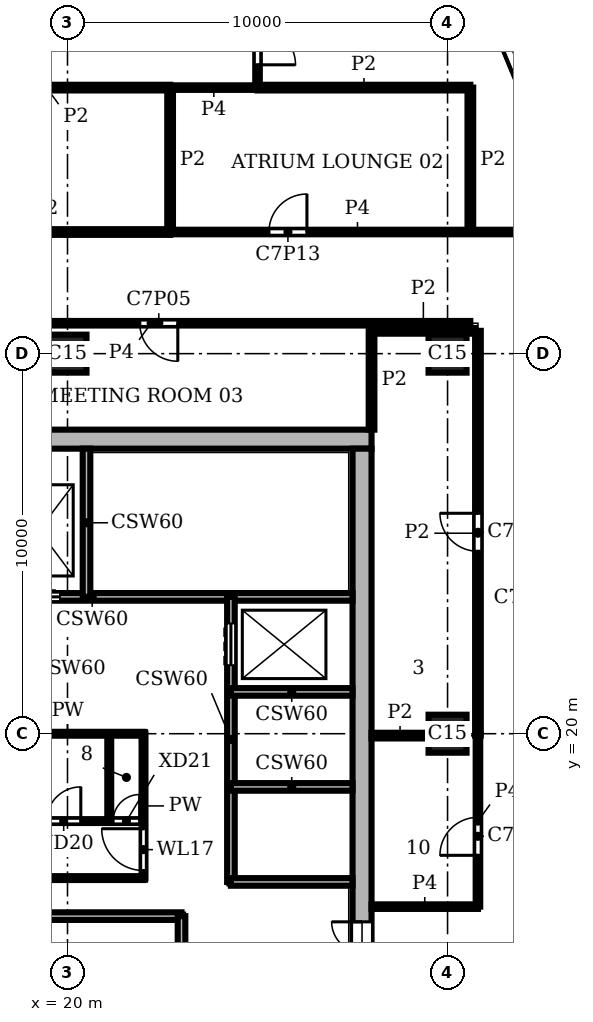
"""IFC4 building model, lengths in metres.
Left out: names, types, materials, properties, quantities, classifications, styles, units other than length and angle.
Written with IfcOpenShell. Run it as: python <this file> out.ifc"""

import sys

from ifc_helpers import new_model, si_unit, direction, frame, frame_2d, origin, origin_2d, place, context, subcontext, project, spatial, rectangle, extrude, element, fill, save


model = new_model("IFC4")
c1 = context("Model", 3, precision=1e-05, world=origin(), true_north=direction((0.0, 1.0)))
c2 = subcontext(c1, "Body", "Model", "MODEL_VIEW")
j1 = project(units=[si_unit("LENGTHUNIT", "METRE"), si_unit("PLANEANGLEUNIT", "RADIAN")], contexts=[c1])
p1 = place(None, origin())
s1 = spatial("IfcSite", under=j1, at=p1, CompositionType="ELEMENT")
p2 = place(p1, origin())
s2 = spatial("IfcBuilding", under=s1, at=p2, CompositionType="ELEMENT")
p3 = place(p2, frame((0.0, 0.0, 313.8)))
s3 = spatial("IfcBuildingStorey", under=s2, at=p3, CompositionType="ELEMENT", Elevation=313.8)
for number, where, z_axis, x_axis in (
    (1, (20.0, 30.0, 0.0), (0.0, 0.0, 1.0), (1.0, 0.0, 0.0)),
    (2, (30.0, 20.0, 0.0), (0.0, 0.0, 1.0), (1.0, 0.0, 0.0)),
    (3, (30.0, 30.0, 0.0), (0.0, 0.0, 1.0), (1.0, 0.0, 0.0)),
):
    element("IfcColumn", number, at=place(p3, frame(where, z_axis=z_axis, x_axis=x_axis)), inside=s3, PredefinedType="COLUMN", context=c2, shape_type="SweptSolid", body=[
        extrude(rectangle(XDim=1.0, YDim=1.0, at=origin_2d()), origin(), (0.0, 0.0, 1.0), 3.9),
    ])
p4 = place(p3, frame((27.75, 8.5, 0.0), z_axis=(0.0, 0.0, 1.0), x_axis=(0.0, 1.0, 0.0)))
e4 = element("IfcWall", 4, at=p4, inside=s3, PredefinedType="SHEAR", context=c2, shape_type="SweptSolid", body=[
    extrude(rectangle(XDim=19.0, YDim=0.5, at=frame_2d((9.5, 0.0))), origin(), (0.0, 0.0, 1.0), 3.9),
])
p5 = place(p4, frame((4.95, 0.0, 0.0)))
e5 = element("IfcOpeningElement", 5, at=p5, cuts=e4, PredefinedType="OPENING", context=c2, shape_type="SweptSolid", body=[
    extrude(rectangle(XDim=1.6, YDim=2.1, at=frame_2d((0.8, 1.05))), frame((0.0, 0.26, 0.0), z_axis=(0.0, -1.0, 0.0), x_axis=(1.0, 0.0, 0.0)), (0.0, 0.0, 1.0), 0.52),
])
p6 = place(p3, frame((28.0, 27.75, 0.0), z_axis=(0.0, 0.0, 1.0), x_axis=(-1.0, 0.0, 0.0)))
e6 = element("IfcWall", 6, at=p6, inside=s3, PredefinedType="SHEAR", context=c2, shape_type="SweptSolid", body=[
    extrude(rectangle(XDim=20.0, YDim=0.5, at=frame_2d((10.0, 0.0))), origin(), (0.0, 0.0, 1.0), 3.9),
])
p7 = place(p3, frame((33.362, 33.974, 0.0), z_axis=(0.0, 0.0, 1.0), x_axis=(-0.382655745237, 0.923891000409, 0.0)))
e7 = element("IfcWall", 7, at=p7, inside=s3, PredefinedType="SOLIDWALL", context=c2, shape_type="SweptSolid", body=[
    extrude(rectangle(XDim=6.053, YDim=0.4, at=frame_2d((3.027, 0.0))), origin(), (0.0, 0.0, 1.0), 3.9),
])
p8 = place(p7, frame((0.227, 0.0, 0.9)))
e8 = element("IfcOpeningElement", 8, at=p8, cuts=e7, PredefinedType="OPENING", context=c2, shape_type="SweptSolid", body=[
    extrude(rectangle(XDim=5.6, YDim=2.35, at=frame_2d((2.8, 1.175))), frame((0.0, 0.21, 0.0), z_axis=(0.0, -1.0, 0.0), x_axis=(1.0, 0.0, 0.0)), (0.0, 0.0, 1.0), 0.42),
])
p9 = place(p3, frame((13.3, 15.2, 0.0), z_axis=(0.0, 0.0, 1.0), x_axis=(1.0, 0.0, 0.0)))
e9 = element("IfcWall", 9, at=p9, inside=s3, PredefinedType="SHEAR", context=c2, shape_type="SweptSolid", body=[
    extrude(rectangle(XDim=9.7, YDim=0.2, at=frame_2d((4.85, 0.0))), origin(), (0.0, 0.0, 1.0), 3.58),
])
p10 = place(p3, frame((24.3, 16.1, 0.0), z_axis=(0.0, 0.0, 1.0), x_axis=(1.0, 0.0, 0.0)))
e10 = element("IfcWall", 10, at=p10, inside=s3, PredefinedType="SHEAR", context=c2, shape_type="SweptSolid", body=[
    extrude(rectangle(XDim=3.2, YDim=0.2, at=frame_2d((1.6, 0.0))), origin(), (0.0, 0.0, 1.0), 3.58),
])
p11 = place(p3, frame((14.0, 16.2, 0.0), z_axis=(0.0, 0.0, 1.0), x_axis=(1.0, 0.0, 0.0)))
e11 = element("IfcWall", 11, at=p11, inside=s3, PredefinedType="PARTITIONING", context=c2, shape_type="SweptSolid", body=[
    extrude(rectangle(XDim=8.0, YDim=0.1, at=frame_2d((4.0, 0.0))), origin(), (0.0, 0.0, 1.0), 3.58),
])
p12 = place(p3, frame((14.0, 17.7, 0.0), z_axis=(0.0, 0.0, 1.0), x_axis=(1.0, 0.0, 0.0)))
e12 = element("IfcWall", 12, at=p12, inside=s3, PredefinedType="PARTITIONING", context=c2, shape_type="SweptSolid", body=[
    extrude(rectangle(XDim=8.0, YDim=0.1, at=frame_2d((4.0, 0.0))), origin(), (0.0, 0.0, 1.0), 3.58),
])
p13 = place(p12, frame((0.45, 0.0, 0.0)))
e13 = element("IfcOpeningElement", 13, at=p13, cuts=e12, PredefinedType="OPENING", context=c2, shape_type="SweptSolid", body=[
    extrude(rectangle(XDim=0.9, YDim=2.1, at=frame_2d((0.45, 1.05))), frame((0.0, 0.06, 0.0), z_axis=(0.0, -1.0, 0.0), x_axis=(1.0, 0.0, 0.0)), (0.0, 0.0, 1.0), 0.12),
])
p14 = place(p12, frame((2.8, 0.0, 0.0)))
e14 = element("IfcOpeningElement", 14, at=p14, cuts=e12, PredefinedType="OPENING", context=c2, shape_type="SweptSolid", body=[
    extrude(rectangle(XDim=0.9, YDim=2.1, at=frame_2d((0.45, 1.05))), frame((0.0, 0.06, 0.0), z_axis=(0.0, -1.0, 0.0), x_axis=(1.0, 0.0, 0.0)), (0.0, 0.0, 1.0), 0.12),
])
p15 = place(p12, frame((5.45, 0.0, 0.0)))
e15 = element("IfcOpeningElement", 15, at=p15, cuts=e12, PredefinedType="OPENING", context=c2, shape_type="SweptSolid", body=[
    extrude(rectangle(XDim=0.9, YDim=2.1, at=frame_2d((0.45, 1.05))), frame((0.0, 0.06, 0.0), z_axis=(0.0, -1.0, 0.0), x_axis=(1.0, 0.0, 0.0)), (0.0, 0.0, 1.0), 0.12),
])
p16 = place(p12, frame((7.2, 0.0, 0.0)))
e16 = element("IfcOpeningElement", 16, at=p16, cuts=e12, PredefinedType="OPENING", context=c2, shape_type="SweptSolid", body=[
    extrude(rectangle(XDim=0.7, YDim=2.1, at=frame_2d((0.35, 1.05))), frame((0.0, 0.06, 0.0), z_axis=(0.0, -1.0, 0.0), x_axis=(1.0, 0.0, 0.0)), (0.0, 0.0, 1.0), 0.12),
])
p17 = place(p3, frame((24.3, 18.6, 0.0), z_axis=(0.0, 0.0, 1.0), x_axis=(1.0, 0.0, 0.0)))
e17 = element("IfcWall", 17, at=p17, inside=s3, PredefinedType="SHEAR", context=c2, shape_type="SweptSolid", body=[
    extrude(rectangle(XDim=3.2, YDim=0.2, at=frame_2d((1.6, 0.0))), origin(), (0.0, 0.0, 1.0), 3.58),
])
p18 = place(p3, frame((18.0, 20.0, 0.0), z_axis=(0.0, 0.0, 1.0), x_axis=(1.0, 0.0, 0.0)))
e18 = element("IfcWall", 18, at=p18, inside=s3, PredefinedType="PARTITIONING", context=c2, shape_type="SweptSolid", body=[
    extrude(rectangle(XDim=4.0, YDim=0.1, at=frame_2d((2.0, 0.0))), origin(), (0.0, 0.0, 1.0), 3.58),
])
p19 = place(p3, frame((24.3, 21.1, 0.0), z_axis=(0.0, 0.0, 1.0), x_axis=(1.0, 0.0, 0.0)))
e19 = element("IfcWall", 19, at=p19, inside=s3, PredefinedType="SHEAR", context=c2, shape_type="SweptSolid", body=[
    extrude(rectangle(XDim=3.2, YDim=0.2, at=frame_2d((1.6, 0.0))), origin(), (0.0, 0.0, 1.0), 3.58),
])
p20 = place(p3, frame((13.8, 23.6, 0.0), z_axis=(0.0, 0.0, 1.0), x_axis=(1.0, 0.0, 0.0)))
e20 = element("IfcWall", 20, at=p20, inside=s3, PredefinedType="SHEAR", context=c2, shape_type="SweptSolid", body=[
    extrude(rectangle(XDim=13.7, YDim=0.2, at=frame_2d((6.85, 0.0))), origin(), (0.0, 0.0, 1.0), 3.58),
])
p21 = place(p20, frame((2.4, 0.0, 0.0)))
e21 = element("IfcOpeningElement", 21, at=p21, cuts=e20, PredefinedType="OPENING", context=c2, shape_type="SweptSolid", body=[
    extrude(rectangle(XDim=1.1, YDim=2.1, at=frame_2d((0.55, 1.05))), frame((0.0, 0.11, 0.0), z_axis=(0.0, -1.0, 0.0), x_axis=(1.0, 0.0, 0.0)), (0.0, 0.0, 1.0), 0.22),
])
p22 = place(p20, frame((4.9, 0.0, 0.0)))
e22 = element("IfcOpeningElement", 22, at=p22, cuts=e20, PredefinedType="OPENING", context=c2, shape_type="SweptSolid", body=[
    extrude(rectangle(XDim=1.1, YDim=2.1, at=frame_2d((0.55, 1.05))), frame((0.0, 0.11, 0.0), z_axis=(0.0, -1.0, 0.0), x_axis=(1.0, 0.0, 0.0)), (0.0, 0.0, 1.0), 0.22),
])
p23 = place(p20, frame((0.15, 0.0, 0.0)))
e23 = element("IfcOpeningElement", 23, at=p23, cuts=e20, PredefinedType="OPENING", context=c2, shape_type="SweptSolid", body=[
    extrude(rectangle(XDim=1.0, YDim=2.1, at=frame_2d((0.5, 1.05))), frame((0.0, 0.11, 0.0), z_axis=(0.0, -1.0, 0.0), x_axis=(1.0, 0.0, 0.0)), (0.0, 0.0, 1.0), 0.22),
])
p24 = place(p3, frame((20.5, 23.6, 0.0), z_axis=(0.0, 0.0, 1.0), x_axis=(0.0, 1.0, 0.0)))
e24 = element("IfcWall", 24, at=p24, inside=s3, PredefinedType="SHEAR", context=c2, shape_type="SweptSolid", body=[
    extrude(rectangle(XDim=3.9, YDim=0.2, at=frame_2d((1.95, 0.0))), origin(), (0.0, 0.0, 1.0), 3.58),
])
p25 = place(p3, frame((21.1, 17.7, 0.0), z_axis=(0.0, 0.0, 1.0), x_axis=(0.0, 1.0, 0.0)))
e25 = element("IfcWall", 25, at=p25, inside=s3, PredefinedType="PARTITIONING", context=c2, shape_type="SweptSolid", body=[
    extrude(rectangle(XDim=2.3, YDim=0.1, at=frame_2d((1.15, 0.0))), origin(), (0.0, 0.0, 1.0), 3.58),
])
p26 = place(p3, frame((22.0, 16.2, 0.0), z_axis=(0.0, 0.0, 1.0), x_axis=(0.0, 1.0, 0.0)))
e26 = element("IfcWall", 26, at=p26, inside=s3, PredefinedType="PARTITIONING", context=c2, shape_type="SweptSolid", body=[
    extrude(rectangle(XDim=3.8, YDim=0.1, at=frame_2d((1.9, 0.0))), origin(), (0.0, 0.0, 1.0), 3.58),
])
p27 = place(p26, frame((0.2, 0.0, 0.0)))
e27 = element("IfcOpeningElement", 27, at=p27, cuts=e26, PredefinedType="OPENING", context=c2, shape_type="SweptSolid", body=[
    extrude(rectangle(XDim=1.1, YDim=2.1, at=frame_2d((0.55, 1.05))), frame((0.0, 0.06, 0.0), z_axis=(0.0, -1.0, 0.0), x_axis=(1.0, 0.0, 0.0)), (0.0, 0.0, 1.0), 0.12),
])
p28 = place(p3, frame((23.0, 12.4, 0.0), z_axis=(0.0, 0.0, 1.0), x_axis=(0.0, 1.0, 0.0)))
e28 = element("IfcWall", 28, at=p28, inside=s3, PredefinedType="SHEAR", context=c2, shape_type="SweptSolid", body=[
    extrude(rectangle(XDim=2.8, YDim=0.2, at=frame_2d((1.4, 0.0))), origin(), (0.0, 0.0, 1.0), 3.58),
])
p29 = place(p28, frame((0.8, 0.0, 0.0)))
e29 = element("IfcOpeningElement", 29, at=p29, cuts=e28, PredefinedType="OPENING", context=c2, shape_type="SweptSolid", body=[
    extrude(rectangle(XDim=1.2, YDim=2.1, at=frame_2d((0.6, 1.05))), frame((0.0, 0.11, 0.0), z_axis=(0.0, -1.0, 0.0), x_axis=(1.0, 0.0, 0.0)), (0.0, 0.0, 1.0), 0.22),
])
p30 = place(p3, frame((24.3, 16.1, 0.0), z_axis=(0.0, 0.0, 1.0), x_axis=(0.0, 1.0, 0.0)))
e30 = element("IfcWall", 30, at=p30, inside=s3, PredefinedType="SHEAR", context=c2, shape_type="SweptSolid", body=[
    extrude(rectangle(XDim=7.5, YDim=0.2, at=frame_2d((3.75, 0.0))), origin(), (0.0, 0.0, 1.0), 3.58),
])
p31 = place(p30, frame((5.7, 0.0, 0.0)))
e31 = element("IfcOpeningElement", 31, at=p31, cuts=e30, PredefinedType="OPENING", context=c2, shape_type="SweptSolid", body=[
    extrude(rectangle(XDim=1.1, YDim=2.1, at=frame_2d((0.55, 1.05))), frame((0.0, 0.11, 0.0), z_axis=(0.0, -1.0, 0.0), x_axis=(1.0, 0.0, 0.0)), (0.0, 0.0, 1.0), 0.22),
])
p32 = place(p3, frame((22.7, 33.2, 0.0), z_axis=(0.0, 0.0, 1.0), x_axis=(0.0, 1.0, 0.0)))
e32 = element("IfcWall", 32, at=p32, inside=s3, PredefinedType="PARTITIONING", context=c2, shape_type="SweptSolid", body=[
    extrude(rectangle(XDim=3.8, YDim=0.15, at=frame_2d((1.9, 0.0))), origin(), (0.0, 0.0, 1.0), 3.58),
])
p33 = place(p3, frame((28.0, 28.0, 0.0), z_axis=(0.0, 0.0, 1.0), x_axis=(0.0, 1.0, 0.0)))
e33 = element("IfcWall", 33, at=p33, inside=s3, PredefinedType="PARTITIONING", context=c2, shape_type="SweptSolid", body=[
    extrude(rectangle(XDim=2.598, YDim=0.15, at=frame_2d((1.299, 0.0))), origin(), (0.0, 0.0, 1.0), 3.58),
])
p34 = place(p3, frame((30.6, 33.2, 0.0), z_axis=(0.0, 0.0, 1.0), x_axis=(0.0, 1.0, 0.0)))
e34 = element("IfcWall", 34, at=p34, inside=s3, PredefinedType="PARTITIONING", context=c2, shape_type="SweptSolid", body=[
    extrude(rectangle(XDim=3.8, YDim=0.15, at=frame_2d((1.9, 0.0))), origin(), (0.0, 0.0, 1.0), 3.58),
])
p35 = place(p3, frame((30.8, 19.95, 0.0), z_axis=(0.0, 0.0, 1.0), x_axis=(0.0, 1.0, 0.0)))
e35 = element("IfcWall", 35, at=p35, inside=s3, PredefinedType="PARTITIONING", context=c2, shape_type="SweptSolid", body=[
    extrude(rectangle(XDim=10.65, YDim=0.15, at=frame_2d((5.325, 0.0))), origin(), (0.0, 0.0, 1.0), 3.58),
])
p36 = place(p35, frame((4.85, 0.0, 0.0)))
e36 = element("IfcOpeningElement", 36, at=p36, cuts=e35, PredefinedType="OPENING", context=c2, shape_type="SweptSolid", body=[
    extrude(rectangle(XDim=1.0, YDim=2.1, at=frame_2d((0.5, 1.05))), frame((0.0, 0.085, 0.0), z_axis=(0.0, -1.0, 0.0), x_axis=(1.0, 0.0, 0.0)), (0.0, 0.0, 1.0), 0.17),
])
p37 = place(p3, frame((28.0, 19.95, 0.0), z_axis=(0.0, 0.0, 1.0), x_axis=(1.0, 0.0, 0.0)))
e37 = element("IfcWall", 37, at=p37, inside=s3, PredefinedType="PARTITIONING", context=c2, shape_type="SweptSolid", body=[
    extrude(rectangle(XDim=1.5, YDim=0.15, at=frame_2d((0.75, 0.0))), origin(), (0.0, 0.0, 1.0), 3.58),
])
p38 = place(p3, frame((28.002, 30.6, 0.0), z_axis=(0.0, 0.0, 1.0), x_axis=(1.0, 0.0, 0.0)))
e38 = element("IfcWall", 38, at=p38, inside=s3, PredefinedType="PARTITIONING", context=c2, shape_type="SweptSolid", body=[
    extrude(rectangle(XDim=2.723, YDim=0.15, at=frame_2d((1.362, 0.0))), origin(), (0.0, 0.0, 1.0), 3.58),
])
p39 = place(p3, frame((16.2, 33.2, 0.0), z_axis=(0.0, 0.0, 1.0), x_axis=(1.0, 0.0, 0.0)))
e39 = element("IfcWall", 39, at=p39, inside=s3, PredefinedType="PARTITIONING", context=c2, shape_type="SweptSolid", body=[
    extrude(rectangle(XDim=6.5, YDim=0.15, at=frame_2d((3.25, 0.0))), origin(), (0.0, 0.0, 1.0), 3.58),
])
p40 = place(p3, frame((16.2, 37.0, 0.0), z_axis=(0.0, 0.0, 1.0), x_axis=(1.0, 0.0, 0.0)))
e40 = element("IfcWall", 40, at=p40, inside=s3, PredefinedType="PARTITIONING", context=c2, shape_type="SweptSolid", body=[
    extrude(rectangle(XDim=6.5, YDim=0.15, at=frame_2d((3.25, 0.0))), origin(), (0.0, 0.0, 1.0), 3.58),
])
p41 = place(p40, frame((2.1, 0.0, 0.0)))
e41 = element("IfcOpeningElement", 41, at=p41, cuts=e40, PredefinedType="OPENING", context=c2, shape_type="SweptSolid", body=[
    extrude(rectangle(XDim=1.0, YDim=2.1, at=frame_2d((0.5, 1.05))), frame((0.0, 0.085, 0.0), z_axis=(0.0, -1.0, 0.0), x_axis=(1.0, 0.0, 0.0)), (0.0, 0.0, 1.0), 0.17),
])
p42 = place(p3, frame((25.0, 37.0, 0.0), z_axis=(0.0, 0.0, 1.0), x_axis=(1.0, 0.0, 0.0)))
e42 = element("IfcWall", 42, at=p42, inside=s3, PredefinedType="PARTITIONING", context=c2, shape_type="SweptSolid", body=[
    extrude(rectangle(XDim=5.6, YDim=0.15, at=frame_2d((2.8, 0.0))), origin(), (0.0, 0.0, 1.0), 3.58),
])
p43 = place(p3, frame((25.0, 37.0, 0.0), z_axis=(0.0, 0.0, 1.0), x_axis=(0.0, 1.0, 0.0)))
e43 = element("IfcWall", 43, at=p43, inside=s3, PredefinedType="PARTITIONING", context=c2, shape_type="SweptSolid", body=[
    extrude(rectangle(XDim=2.4, YDim=0.12, at=frame_2d((1.2, 0.0))), origin(), (0.0, 0.0, 1.0), 3.58),
])
p44 = place(p43, frame((0.6, 0.0, 0.0)))
e44 = element("IfcOpeningElement", 44, at=p44, cuts=e43, PredefinedType="OPENING", context=c2, shape_type="SweptSolid", body=[
    extrude(rectangle(XDim=1.0, YDim=2.1, at=frame_2d((0.5, 1.05))), frame((0.0, 0.07, 0.0), z_axis=(0.0, -1.0, 0.0), x_axis=(1.0, 0.0, 0.0)), (0.0, 0.0, 1.0), 0.14),
])
p45 = place(p3, frame((30.8, 15.45, 0.0), z_axis=(0.0, 0.0, 1.0), x_axis=(0.0, 1.0, 0.0)))
e45 = element("IfcWall", 45, at=p45, inside=s3, PredefinedType="PARTITIONING", context=c2, shape_type="SweptSolid", body=[
    extrude(rectangle(XDim=4.5, YDim=0.12, at=frame_2d((2.25, 0.0))), origin(), (0.0, 0.0, 1.0), 3.58),
])
p46 = place(p45, frame((1.35, 0.0, 0.0)))
e46 = element("IfcOpeningElement", 46, at=p46, cuts=e45, PredefinedType="OPENING", context=c2, shape_type="SweptSolid", body=[
    extrude(rectangle(XDim=1.0, YDim=2.1, at=frame_2d((0.5, 1.05))), frame((0.0, 0.07, 0.0), z_axis=(0.0, -1.0, 0.0), x_axis=(1.0, 0.0, 0.0)), (0.0, 0.0, 1.0), 0.14),
])
p47 = place(p3, frame((28.0, 15.45, 0.0), z_axis=(0.0, 0.0, 1.0), x_axis=(1.0, 0.0, 0.0)))
e47 = element("IfcWall", 47, at=p47, inside=s3, PredefinedType="PARTITIONING", context=c2, shape_type="SweptSolid", body=[
    extrude(rectangle(XDim=2.8, YDim=0.12, at=frame_2d((1.4, 0.0))), origin(), (0.0, 0.0, 1.0), 3.58),
])
p48 = place(p3, frame((13.802, 30.8, 0.0), z_axis=(0.0, 0.0, 1.0), x_axis=(1.0, 0.0, 0.0)))
e48 = element("IfcWall", 48, at=p48, inside=s3, PredefinedType="PARTITIONING", context=c2, shape_type="SweptSolid", body=[
    extrude(rectangle(XDim=16.797, YDim=0.12, at=frame_2d((8.398, 0.0))), origin(), (0.0, 0.0, 1.0), 3.58),
])
p49 = place(p48, frame((8.1, 0.0, 0.0)))
e49 = element("IfcOpeningElement", 49, at=p49, cuts=e48, PredefinedType="OPENING", context=c2, shape_type="SweptSolid", body=[
    extrude(rectangle(XDim=1.0, YDim=2.1, at=frame_2d((0.5, 1.05))), frame((0.0, 0.07, 0.0), z_axis=(0.0, -1.0, 0.0), x_axis=(1.0, 0.0, 0.0)), (0.0, 0.0, 1.0), 0.14),
])
p50 = place(p3, frame((22.7, 33.2, 0.0), z_axis=(0.0, 0.0, 1.0), x_axis=(1.0, 0.0, 0.0)))
e50 = element("IfcWall", 50, at=p50, inside=s3, PredefinedType="PARTITIONING", context=c2, shape_type="SweptSolid", body=[
    extrude(rectangle(XDim=9.86, YDim=0.12, at=frame_2d((4.93, 0.0))), origin(), (0.0, 0.0, 1.0), 3.58),
])
p51 = place(p50, frame((2.6, 0.0, 0.0)))
e51 = element("IfcOpeningElement", 51, at=p51, cuts=e50, PredefinedType="OPENING", context=c2, shape_type="SweptSolid", body=[
    extrude(rectangle(XDim=1.0, YDim=2.1, at=frame_2d((0.5, 1.05))), frame((0.0, 0.07, 0.0), z_axis=(0.0, -1.0, 0.0), x_axis=(1.0, 0.0, 0.0)), (0.0, 0.0, 1.0), 0.14),
])
p52 = place(p3, frame((22.7, 37.0, 0.0), z_axis=(0.0, 0.0, 1.0), x_axis=(1.0, 0.0, 0.0)))
e52 = element("IfcWall", 52, at=p52, inside=s3, PredefinedType="PARTITIONING", context=c2, shape_type="SweptSolid", body=[
    extrude(rectangle(XDim=2.3, YDim=0.12, at=frame_2d((1.15, 0.0))), origin(), (0.0, 0.0, 1.0), 3.58),
])
p53 = place(p8, origin())
e53 = element("IfcWindow", 53, at=p53, inside=s3, PartitioningType="SINGLE_PANEL", PredefinedType="WINDOW", context=c2, shape_type="SweptSolid", body=[
    extrude(rectangle(XDim=5.6, YDim=2.35, at=frame_2d((2.8, 1.175))), frame((0.0, 0.16, 0.0), z_axis=(0.0, -1.0, 0.0), x_axis=(1.0, 0.0, 0.0)), (0.0, 0.0, 1.0), 0.06),
])
fill(e8, e53)
p54 = place(p31, origin())
e54 = element("IfcDoor", 54, at=p54, inside=s3, OperationType="DOUBLE_DOOR_SLIDING", PredefinedType="DOOR", context=c2, shape_type="SweptSolid", body=[
    extrude(rectangle(XDim=1.1, YDim=2.1, at=frame_2d((0.55, 1.05))), frame((0.0, 0.025, 0.0), z_axis=(0.0, -1.0, 0.0), x_axis=(1.0, 0.0, 0.0)), (0.0, 0.0, 1.0), 0.05),
])
fill(e31, e54)
p55 = place(p22, origin())
e55 = element("IfcDoor", 55, at=p55, inside=s3, OperationType="DOUBLE_DOOR_SLIDING", PredefinedType="DOOR", context=c2, shape_type="SweptSolid", body=[
    extrude(rectangle(XDim=1.1, YDim=2.1, at=frame_2d((0.55, 1.05))), frame((0.0, 0.025, 0.0), z_axis=(0.0, -1.0, 0.0), x_axis=(1.0, 0.0, 0.0)), (0.0, 0.0, 1.0), 0.05),
])
fill(e22, e55)
p56 = place(p27, origin())
e56 = element("IfcDoor", 56, at=p56, inside=s3, OperationType="SINGLE_SWING_RIGHT", PredefinedType="DOOR", context=c2, shape_type="SweptSolid", body=[
    extrude(rectangle(XDim=1.1, YDim=2.1, at=frame_2d((0.55, 1.05))), frame((0.0, 0.025, 0.0), z_axis=(0.0, -1.0, 0.0), x_axis=(1.0, 0.0, 0.0)), (0.0, 0.0, 1.0), 0.05),
])
fill(e27, e56)
p57 = place(p15, origin())
e57 = element("IfcDoor", 57, at=p57, inside=s3, OperationType="SINGLE_SWING_RIGHT", PredefinedType="DOOR", context=c2, shape_type="SweptSolid", body=[
    extrude(rectangle(XDim=0.9, YDim=2.1, at=frame_2d((0.45, 1.05))), frame((0.0, 0.025, 0.0), z_axis=(0.0, -1.0, 0.0), x_axis=(1.0, 0.0, 0.0)), (0.0, 0.0, 1.0), 0.05),
])
fill(e15, e57)
p58 = place(p16, origin())
e58 = element("IfcDoor", 58, at=p58, inside=s3, OperationType="SINGLE_SWING_RIGHT", PredefinedType="DOOR", context=c2, shape_type="SweptSolid", body=[
    extrude(rectangle(XDim=0.7, YDim=2.1, at=frame_2d((0.35, 1.05))), frame((0.0, 0.025, 0.0), z_axis=(0.0, -1.0, 0.0), x_axis=(1.0, 0.0, 0.0)), (0.0, 0.0, 1.0), 0.05),
])
fill(e16, e58)
p59 = place(p5, origin())
e59 = element("IfcDoor", 59, at=p59, inside=s3, OperationType="DOUBLE_DOOR_SINGLE_SWING", PredefinedType="DOOR", context=c2, shape_type="SweptSolid", body=[
    extrude(rectangle(XDim=1.6, YDim=2.1, at=frame_2d((0.8, 1.05))), frame((0.0, 0.025, 0.0), z_axis=(0.0, -1.0, 0.0), x_axis=(1.0, 0.0, 0.0)), (0.0, 0.0, 1.0), 0.05),
])
fill(e5, e59)
p60 = place(p44, frame((1.0, 0.0, 0.0), z_axis=(0.0, 0.0, 1.0), x_axis=(-1.0, 0.0, 0.0)))
e60 = element("IfcDoor", 60, at=p60, inside=s3, OperationType="SINGLE_SWING_RIGHT", PredefinedType="DOOR", context=c2, shape_type="SweptSolid", body=[
    extrude(rectangle(XDim=1.0, YDim=2.1, at=frame_2d((0.5, 1.05))), frame((0.0, 0.025, 0.0), z_axis=(0.0, -1.0, 0.0), x_axis=(1.0, 0.0, 0.0)), (0.0, 0.0, 1.0), 0.05),
])
fill(e44, e60)
p61 = place(p49, frame((1.0, 0.0, 0.0), z_axis=(0.0, 0.0, 1.0), x_axis=(-1.0, 0.0, 0.0)))
e61 = element("IfcDoor", 61, at=p61, inside=s3, OperationType="SINGLE_SWING_LEFT", PredefinedType="DOOR", context=c2, shape_type="SweptSolid", body=[
    extrude(rectangle(XDim=1.0, YDim=2.1, at=frame_2d((0.5, 1.05))), frame((0.0, 0.025, 0.0), z_axis=(0.0, -1.0, 0.0), x_axis=(1.0, 0.0, 0.0)), (0.0, 0.0, 1.0), 0.05),
])
fill(e49, e61)
p62 = place(p46, origin())
e62 = element("IfcDoor", 62, at=p62, inside=s3, OperationType="SINGLE_SWING_LEFT", PredefinedType="DOOR", context=c2, shape_type="SweptSolid", body=[
    extrude(rectangle(XDim=1.0, YDim=2.1, at=frame_2d((0.5, 1.05))), frame((0.0, 0.025, 0.0), z_axis=(0.0, -1.0, 0.0), x_axis=(1.0, 0.0, 0.0)), (0.0, 0.0, 1.0), 0.05),
])
fill(e46, e62)
p63 = place(p36, origin())
e63 = element("IfcDoor", 63, at=p63, inside=s3, OperationType="SINGLE_SWING_RIGHT", PredefinedType="DOOR", context=c2, shape_type="SweptSolid", body=[
    extrude(rectangle(XDim=1.0, YDim=2.1, at=frame_2d((0.5, 1.05))), frame((0.0, 0.025, 0.0), z_axis=(0.0, -1.0, 0.0), x_axis=(1.0, 0.0, 0.0)), (0.0, 0.0, 1.0), 0.05),
])
fill(e36, e63)
p64 = place(p51, origin())
e64 = element("IfcDoor", 64, at=p64, inside=s3, OperationType="SINGLE_SWING_RIGHT", PredefinedType="DOOR", context=c2, shape_type="SweptSolid", body=[
    extrude(rectangle(XDim=1.0, YDim=2.1, at=frame_2d((0.5, 1.05))), frame((0.0, 0.025, 0.0), z_axis=(0.0, -1.0, 0.0), x_axis=(1.0, 0.0, 0.0)), (0.0, 0.0, 1.0), 0.05),
])
fill(e51, e64)
save(model, sys.argv[1])
